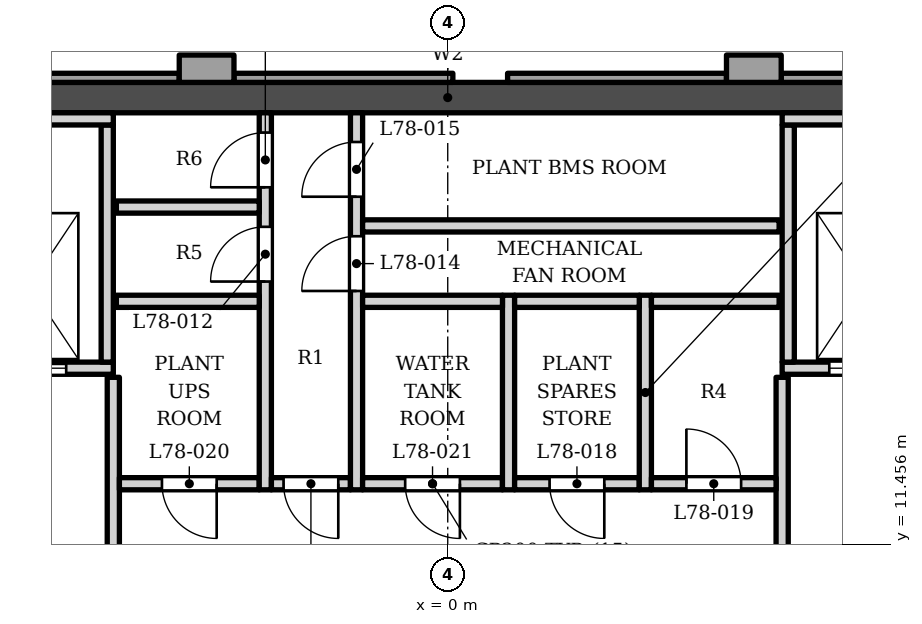
"""IFC4 building model, lengths in metres.
Left out: names, types, materials, properties, quantities, classifications, styles, units other than length and angle.
Written with IfcOpenShell. Run it as: python <this file> out.ifc"""

import sys

from ifc_helpers import new_model, si_unit, direction, frame, frame_2d, origin, place, context, subcontext, project, spatial, polyline, rectangle, outline, extrude, element, fill, save


model = new_model("IFC4")
c1 = context("Model", 3, precision=1e-05, world=origin(), true_north=direction((0.0, 1.0)))
c2 = subcontext(c1, "Body", "Model", "MODEL_VIEW")
j1 = project(units=[si_unit("LENGTHUNIT", "METRE"), si_unit("PLANEANGLEUNIT", "RADIAN")], contexts=[c1])
p1 = place(None, origin())
s1 = spatial("IfcSite", under=j1, at=p1, CompositionType="ELEMENT")
p2 = place(p1, origin())
s2 = spatial("IfcBuilding", under=s1, at=p2, CompositionType="ELEMENT")
p3 = place(p2, frame((0.0, 0.0, 335.5)))
s3 = spatial("IfcBuildingStorey", under=s2, at=p3, CompositionType="ELEMENT", Elevation=335.5)
p4 = place(p3, frame((-12.1, 18.802, 0.0), z_axis=(0.0, 0.0, 1.0), x_axis=(1.0, 0.0, 0.0)))
e1 = element("IfcWall", 1, at=p4, inside=s3, PredefinedType="SHEAR", context=c2, shape_type="SweptSolid", body=[
    extrude(rectangle(XDim=24.2, YDim=0.5, at=frame_2d((12.1, 0.0))), origin(), (0.0, 0.0, 1.0), 5.0),
])
p5 = place(p3, origin())
e2 = element("IfcWall", 2, at=p5, inside=s3, PredefinedType="SOLIDWALL", context=c2, shape_type="SweptSolid", body=[
    extrude(outline(polyline([(4.584, 19.502), (4.584, 19.052), (5.484, 19.052), (5.484, 19.502), (4.584, 19.502)])), origin(), (0.0, 0.0, 1.0), 3.8),
])
p6 = place(p3, origin())
e3 = element("IfcWall", 3, at=p6, inside=s3, PredefinedType="SOLIDWALL", context=c2, shape_type="SweptSolid", body=[
    extrude(outline(polyline([(-4.416, 19.502), (-4.416, 19.052), (-3.516, 19.052), (-3.516, 19.502), (-4.416, 19.502)])), origin(), (0.0, 0.0, 1.0), 3.8),
])
p7 = place(p3, origin())
e4 = element("IfcWall", 4, at=p7, inside=s3, PredefinedType="ELEMENTEDWALL", context=c2, shape_type="SweptSolid", body=[
    extrude(outline(polyline([(9.084, 19.203), (5.484, 19.203), (5.484, 19.052), (9.084, 19.052), (9.084, 19.203)])), origin(), (0.0, 0.0, 1.0), 3.8),
])
p8 = place(p3, origin())
e5 = element("IfcWall", 5, at=p8, inside=s3, PredefinedType="ELEMENTEDWALL", context=c2, shape_type="SweptSolid", body=[
    extrude(outline(polyline([(4.584, 19.203), (0.984, 19.203), (0.984, 19.052), (4.584, 19.052), (4.584, 19.203)])), origin(), (0.0, 0.0, 1.0), 3.8),
])
p9 = place(p3, origin())
e6 = element("IfcWall", 6, at=p9, inside=s3, PredefinedType="ELEMENTEDWALL", context=c2, shape_type="SweptSolid", body=[
    extrude(outline(polyline([(0.084, 19.203), (-3.516, 19.203), (-3.516, 19.052), (0.084, 19.052), (0.084, 19.203)])), origin(), (0.0, 0.0, 1.0), 3.8),
])
p10 = place(p3, origin())
e7 = element("IfcWall", 7, at=p10, inside=s3, PredefinedType="ELEMENTEDWALL", context=c2, shape_type="SweptSolid", body=[
    extrude(outline(polyline([(-4.416, 19.203), (-8.016, 19.203), (-8.016, 19.052), (-4.416, 19.052), (-4.416, 19.203)])), origin(), (0.0, 0.0, 1.0), 3.8),
])
for number, where, z_axis, x_axis in (
    (8, (4.584, 19.278, 3.8), (0.0, 0.0, 1.0), (1.0, 0.0, 0.0)),
    (9, (-4.416, 19.278, 3.8), (0.0, 0.0, 1.0), (1.0, 0.0, 0.0)),
):
    element("IfcWall", number, at=place(p3, frame(where, z_axis=z_axis, x_axis=x_axis)), inside=s3, PredefinedType="ELEMENTEDWALL", context=c2, shape_type="SweptSolid", body=[
        extrude(rectangle(XDim=0.9, YDim=0.45, at=frame_2d((0.45, 0.0))), origin(), (0.0, 0.0, 1.0), 10.851),
    ])
p11 = place(p3, frame((-5.5, 6.353, 0.0), z_axis=(0.0, 0.0, 1.0), x_axis=(0.0, 1.0, 0.0)))
e10 = element("IfcWall", 10, at=p11, inside=s3, PredefinedType="SOLIDWALL", context=c2, shape_type="SweptSolid", body=[
    extrude(outline(polyline([(0.0, 0.0), (7.85, 0.0), (7.85, 4.7), (0.623, 4.7), (0.0, 4.177), (0.0, 0.0)])), frame((0.0, 0.1, 0.0), z_axis=(0.0, -1.0, 0.0), x_axis=(1.0, 0.0, 0.0)), (0.0, 0.0, 1.0), 0.2),
])
p12 = place(p11, frame((3.6, 0.0, 0.0)))
e11 = element("IfcOpeningElement", 11, at=p12, cuts=e10, PredefinedType="OPENING", context=c2, shape_type="SweptSolid", body=[
    extrude(rectangle(XDim=1.4, YDim=2.1, at=frame_2d((0.7, 1.05))), frame((0.0, 0.11, 0.0), z_axis=(0.0, -1.0, 0.0), x_axis=(1.0, 0.0, 0.0)), (0.0, 0.0, 1.0), 0.22),
])
p13 = place(p3, frame((5.5, 6.353, 0.0), z_axis=(0.0, 0.0, 1.0), x_axis=(0.0, 1.0, 0.0)))
e12 = element("IfcWall", 12, at=p13, inside=s3, PredefinedType="SOLIDWALL", context=c2, shape_type="SweptSolid", body=[
    extrude(outline(polyline([(0.0, 0.0), (7.85, 0.0), (7.85, 4.7), (0.623, 4.7), (0.0, 4.177), (0.0, 0.0)])), frame((0.0, 0.1, 0.0), z_axis=(0.0, -1.0, 0.0), x_axis=(1.0, 0.0, 0.0)), (0.0, 0.0, 1.0), 0.2),
])
p14 = place(p13, frame((3.6, 0.0, 0.0)))
e13 = element("IfcOpeningElement", 13, at=p14, cuts=e12, PredefinedType="OPENING", context=c2, shape_type="SweptSolid", body=[
    extrude(rectangle(XDim=1.4, YDim=2.1, at=frame_2d((0.7, 1.05))), frame((0.0, 0.11, 0.0), z_axis=(0.0, -1.0, 0.0), x_axis=(1.0, 0.0, 0.0)), (0.0, 0.0, 1.0), 0.22),
])
p15 = place(p3, frame((-5.4, 12.453, 0.0), z_axis=(0.0, 0.0, 1.0), x_axis=(1.0, 0.0, 0.0)))
e14 = element("IfcWall", 14, at=p15, inside=s3, PredefinedType="PARTITIONING", context=c2, shape_type="SweptSolid", body=[
    extrude(rectangle(XDim=2.3, YDim=0.2, at=frame_2d((1.15, 0.0))), origin(), (0.0, 0.0, 1.0), 4.7),
])
p16 = place(p15, frame((0.7, 0.0, 0.0)))
e15 = element("IfcOpeningElement", 15, at=p16, cuts=e14, PredefinedType="OPENING", context=c2, shape_type="SweptSolid", body=[
    extrude(rectangle(XDim=0.9, YDim=2.1, at=frame_2d((0.45, 1.05))), frame((0.0, 0.11, 0.0), z_axis=(0.0, -1.0, 0.0), x_axis=(1.0, 0.0, 0.0)), (0.0, 0.0, 1.0), 0.22),
])
p17 = place(p3, frame((-3.0, 12.353, 0.0), z_axis=(0.0, 0.0, 1.0), x_axis=(0.0, 1.0, 0.0)))
e16 = element("IfcWall", 16, at=p17, inside=s3, PredefinedType="PARTITIONING", context=c2, shape_type="SweptSolid", body=[
    extrude(rectangle(XDim=6.2, YDim=0.2, at=frame_2d((3.1, 0.0))), origin(), (0.0, 0.0, 1.0), 4.7),
])
p18 = place(p17, frame((3.425, 0.0, 0.0)))
e17 = element("IfcOpeningElement", 17, at=p18, cuts=e16, PredefinedType="OPENING", context=c2, shape_type="SweptSolid", body=[
    extrude(rectangle(XDim=0.9, YDim=2.1, at=frame_2d((0.45, 1.05))), frame((0.0, 0.11, 0.0), z_axis=(0.0, -1.0, 0.0), x_axis=(1.0, 0.0, 0.0)), (0.0, 0.0, 1.0), 0.22),
])
p19 = place(p17, frame((4.975, 0.0, 0.0)))
e18 = element("IfcOpeningElement", 18, at=p19, cuts=e16, PredefinedType="OPENING", context=c2, shape_type="SweptSolid", body=[
    extrude(rectangle(XDim=0.9, YDim=2.1, at=frame_2d((0.45, 1.05))), frame((0.0, 0.11, 0.0), z_axis=(0.0, -1.0, 0.0), x_axis=(1.0, 0.0, 0.0)), (0.0, 0.0, 1.0), 0.22),
])
p20 = place(p3, frame((-2.9, 12.453, 0.0), z_axis=(0.0, 0.0, 1.0), x_axis=(1.0, 0.0, 0.0)))
e19 = element("IfcWall", 19, at=p20, inside=s3, PredefinedType="PARTITIONING", context=c2, shape_type="SweptSolid", body=[
    extrude(rectangle(XDim=1.3, YDim=0.2, at=frame_2d((0.65, 0.0))), origin(), (0.0, 0.0, 1.0), 4.7),
])
p21 = place(p20, frame((0.2, 0.0, 0.0)))
e20 = element("IfcOpeningElement", 20, at=p21, cuts=e19, PredefinedType="OPENING", context=c2, shape_type="SweptSolid", body=[
    extrude(rectangle(XDim=0.9, YDim=2.1, at=frame_2d((0.45, 1.05))), frame((0.0, 0.11, 0.0), z_axis=(0.0, -1.0, 0.0), x_axis=(1.0, 0.0, 0.0)), (0.0, 0.0, 1.0), 0.22),
])
p22 = place(p3, frame((-1.5, 12.353, 0.0), z_axis=(0.0, 0.0, 1.0), x_axis=(0.0, 1.0, 0.0)))
e21 = element("IfcWall", 21, at=p22, inside=s3, PredefinedType="PARTITIONING", context=c2, shape_type="SweptSolid", body=[
    extrude(rectangle(XDim=6.2, YDim=0.2, at=frame_2d((3.1, 0.0))), origin(), (0.0, 0.0, 1.0), 4.7),
])
p23 = place(p22, frame((3.27, 0.0, 0.0)))
e22 = element("IfcOpeningElement", 22, at=p23, cuts=e21, PredefinedType="OPENING", context=c2, shape_type="SweptSolid", body=[
    extrude(rectangle(XDim=0.9, YDim=2.1, at=frame_2d((0.45, 1.05))), frame((0.0, 0.11, 0.0), z_axis=(0.0, -1.0, 0.0), x_axis=(1.0, 0.0, 0.0)), (0.0, 0.0, 1.0), 0.22),
])
p24 = place(p22, frame((4.82, 0.0, 0.0)))
e23 = element("IfcOpeningElement", 23, at=p24, cuts=e21, PredefinedType="OPENING", context=c2, shape_type="SweptSolid", body=[
    extrude(rectangle(XDim=0.9, YDim=2.1, at=frame_2d((0.45, 1.05))), frame((0.0, 0.11, 0.0), z_axis=(0.0, -1.0, 0.0), x_axis=(1.0, 0.0, 0.0)), (0.0, 0.0, 1.0), 0.22),
])
p25 = place(p3, frame((-1.4, 12.453, 0.0), z_axis=(0.0, 0.0, 1.0), x_axis=(1.0, 0.0, 0.0)))
e24 = element("IfcWall", 24, at=p25, inside=s3, PredefinedType="PARTITIONING", context=c2, shape_type="SweptSolid", body=[
    extrude(rectangle(XDim=2.3, YDim=0.2, at=frame_2d((1.15, 0.0))), origin(), (0.0, 0.0, 1.0), 4.7),
])
p26 = place(p25, frame((0.7, 0.0, 0.0)))
e25 = element("IfcOpeningElement", 25, at=p26, cuts=e24, PredefinedType="OPENING", context=c2, shape_type="SweptSolid", body=[
    extrude(rectangle(XDim=0.9, YDim=2.1, at=frame_2d((0.45, 1.05))), frame((0.0, 0.11, 0.0), z_axis=(0.0, -1.0, 0.0), x_axis=(1.0, 0.0, 0.0)), (0.0, 0.0, 1.0), 0.22),
])
p27 = place(p3, frame((1.0, 12.353, 0.0), z_axis=(0.0, 0.0, 1.0), x_axis=(0.0, 1.0, 0.0)))
e26 = element("IfcWall", 26, at=p27, inside=s3, PredefinedType="PARTITIONING", context=c2, shape_type="SweptSolid", body=[
    extrude(rectangle(XDim=3.2, YDim=0.2, at=frame_2d((1.6, 0.0))), origin(), (0.0, 0.0, 1.0), 4.7),
])
p28 = place(p3, frame((1.1, 12.453, 0.0), z_axis=(0.0, 0.0, 1.0), x_axis=(1.0, 0.0, 0.0)))
e27 = element("IfcWall", 27, at=p28, inside=s3, PredefinedType="PARTITIONING", context=c2, shape_type="SweptSolid", body=[
    extrude(rectangle(XDim=2.05, YDim=0.2, at=frame_2d((1.025, 0.0))), origin(), (0.0, 0.0, 1.0), 4.7),
])
p29 = place(p28, frame((0.575, 0.0, 0.0)))
e28 = element("IfcOpeningElement", 28, at=p29, cuts=e27, PredefinedType="OPENING", context=c2, shape_type="SweptSolid", body=[
    extrude(rectangle(XDim=0.9, YDim=2.1, at=frame_2d((0.45, 1.05))), frame((0.0, 0.11, 0.0), z_axis=(0.0, -1.0, 0.0), x_axis=(1.0, 0.0, 0.0)), (0.0, 0.0, 1.0), 0.22),
])
p30 = place(p3, frame((3.25, 12.353, 0.0), z_axis=(0.0, 0.0, 1.0), x_axis=(0.0, 1.0, 0.0)))
e29 = element("IfcWall", 29, at=p30, inside=s3, PredefinedType="PARTITIONING", context=c2, shape_type="SweptSolid", body=[
    extrude(rectangle(XDim=3.2, YDim=0.2, at=frame_2d((1.6, 0.0))), origin(), (0.0, 0.0, 1.0), 4.7),
])
p31 = place(p3, frame((3.35, 12.453, 0.0), z_axis=(0.0, 0.0, 1.0), x_axis=(1.0, 0.0, 0.0)))
e30 = element("IfcWall", 30, at=p31, inside=s3, PredefinedType="PARTITIONING", context=c2, shape_type="SweptSolid", body=[
    extrude(rectangle(XDim=2.05, YDim=0.2, at=frame_2d((1.025, 0.0))), origin(), (0.0, 0.0, 1.0), 4.7),
])
p32 = place(p31, frame((0.575, 0.0, 0.0)))
e31 = element("IfcOpeningElement", 31, at=p32, cuts=e30, PredefinedType="OPENING", context=c2, shape_type="SweptSolid", body=[
    extrude(rectangle(XDim=0.9, YDim=2.1, at=frame_2d((0.45, 1.05))), frame((0.0, 0.11, 0.0), z_axis=(0.0, -1.0, 0.0), x_axis=(1.0, 0.0, 0.0)), (0.0, 0.0, 1.0), 0.22),
])
p33 = place(p3, frame((-8.05, 14.353, 0.0), z_axis=(0.0, 0.0, 1.0), x_axis=(1.0, 0.0, 0.0)))
e32 = element("IfcWall", 32, at=p33, inside=s3, PredefinedType="SOLIDWALL", context=c2, shape_type="SweptSolid", body=[
    extrude(rectangle(XDim=2.55, YDim=0.2, at=frame_2d((1.275, 0.0))), origin(), (0.0, 0.0, 1.0), 4.7),
])
p34 = place(p33, frame((0.575, 0.0, 0.0)))
e33 = element("IfcOpeningElement", 33, at=p34, cuts=e32, PredefinedType="OPENING", context=c2, shape_type="SweptSolid", body=[
    extrude(rectangle(XDim=1.2, YDim=2.1, at=frame_2d((0.6, 1.05))), frame((0.0, 0.11, 0.0), z_axis=(0.0, -1.0, 0.0), x_axis=(1.0, 0.0, 0.0)), (0.0, 0.0, 1.0), 0.22),
])
p35 = place(p3, frame((5.5, 14.353, 0.0), z_axis=(0.0, 0.0, 1.0), x_axis=(1.0, 0.0, 0.0)))
e34 = element("IfcWall", 34, at=p35, inside=s3, PredefinedType="SOLIDWALL", context=c2, shape_type="SweptSolid", body=[
    extrude(rectangle(XDim=2.55, YDim=0.2, at=frame_2d((1.275, 0.0))), origin(), (0.0, 0.0, 1.0), 4.7),
])
p36 = place(p35, frame((0.775, 0.0, 0.0)))
e35 = element("IfcOpeningElement", 35, at=p36, cuts=e34, PredefinedType="OPENING", context=c2, shape_type="SweptSolid", body=[
    extrude(rectangle(XDim=1.2, YDim=2.1, at=frame_2d((0.6, 1.05))), frame((0.0, 0.11, 0.0), z_axis=(0.0, -1.0, 0.0), x_axis=(1.0, 0.0, 0.0)), (0.0, 0.0, 1.0), 0.22),
])
for number, where, z_axis, x_axis in (
    (36, (-5.6, 14.453, 0.0), (0.0, 0.0, 1.0), (0.0, 1.0, 0.0)),
    (37, (5.6, 14.453, 0.0), (0.0, 0.0, 1.0), (0.0, 1.0, 0.0)),
):
    element("IfcWall", number, at=place(p3, frame(where, z_axis=z_axis, x_axis=x_axis)), inside=s3, PredefinedType="SOLIDWALL", context=c2, shape_type="SweptSolid", body=[
        extrude(rectangle(XDim=3.9, YDim=0.2, at=frame_2d((1.95, 0.0))), origin(), (0.0, 0.0, 1.0), 4.7),
    ])
p37 = place(p3, frame((-5.45, 15.453, 0.0), z_axis=(0.0, 0.0, 1.0), x_axis=(1.0, 0.0, 0.0)))
e38 = element("IfcWall", 38, at=p37, inside=s3, PredefinedType="SOLIDWALL", context=c2, shape_type="SweptSolid", body=[
    extrude(rectangle(XDim=2.35, YDim=0.2, at=frame_2d((1.175, 0.0))), origin(), (0.0, 0.0, 1.0), 4.7),
])
p38 = place(p3, frame((-1.4, 15.453, 0.0), z_axis=(0.0, 0.0, 1.0), x_axis=(1.0, 0.0, 0.0)))
e39 = element("IfcWall", 39, at=p38, inside=s3, PredefinedType="PARTITIONING", context=c2, shape_type="SweptSolid", body=[
    extrude(rectangle(XDim=2.3, YDim=0.2, at=frame_2d((1.15, 0.0))), origin(), (0.0, 0.0, 1.0), 4.7),
])
p39 = place(p3, frame((1.1, 15.453, 0.0), z_axis=(0.0, 0.0, 1.0), x_axis=(1.0, 0.0, 0.0)))
e40 = element("IfcWall", 40, at=p39, inside=s3, PredefinedType="PARTITIONING", context=c2, shape_type="SweptSolid", body=[
    extrude(rectangle(XDim=2.05, YDim=0.2, at=frame_2d((1.025, 0.0))), origin(), (0.0, 0.0, 1.0), 4.7),
])
p40 = place(p3, frame((3.35, 15.453, 0.0), z_axis=(0.0, 0.0, 1.0), x_axis=(1.0, 0.0, 0.0)))
e41 = element("IfcWall", 41, at=p40, inside=s3, PredefinedType="SOLIDWALL", context=c2, shape_type="SweptSolid", body=[
    extrude(rectangle(XDim=2.1, YDim=0.2, at=frame_2d((1.05, 0.0))), origin(), (0.0, 0.0, 1.0), 4.7),
])
p41 = place(p3, frame((-1.4, 16.693, 0.0), z_axis=(0.0, 0.0, 1.0), x_axis=(1.0, 0.0, 0.0)))
e42 = element("IfcWall", 42, at=p41, inside=s3, PredefinedType="SOLIDWALL", context=c2, shape_type="SweptSolid", body=[
    extrude(rectangle(XDim=6.85, YDim=0.2, at=frame_2d((3.425, 0.0))), origin(), (0.0, 0.0, 1.0), 4.7),
])
p42 = place(p3, frame((-5.45, 17.003, 0.0), z_axis=(0.0, 0.0, 1.0), x_axis=(1.0, 0.0, 0.0)))
e43 = element("IfcWall", 43, at=p42, inside=s3, PredefinedType="SOLIDWALL", context=c2, shape_type="SweptSolid", body=[
    extrude(rectangle(XDim=2.35, YDim=0.2, at=frame_2d((1.175, 0.0))), origin(), (0.0, 0.0, 1.0), 4.7),
])
for number, where, z_axis, x_axis in (
    (44, (-8.05, 18.453, 0.0), (0.0, 0.0, 1.0), (1.0, 0.0, 0.0)),
    (45, (5.5, 18.453, 0.0), (0.0, 0.0, 1.0), (1.0, 0.0, 0.0)),
):
    element("IfcWall", number, at=place(p3, frame(where, z_axis=z_axis, x_axis=x_axis)), inside=s3, PredefinedType="SOLIDWALL", context=c2, shape_type="SweptSolid", body=[
        extrude(rectangle(XDim=2.55, YDim=0.2, at=frame_2d((1.275, 0.0))), origin(), (0.0, 0.0, 1.0), 4.7),
    ])
p43 = place(p34, origin())
e46 = element("IfcDoor", 46, at=p43, inside=s3, OperationType="DOUBLE_DOOR_SLIDING", PredefinedType="DOOR", context=c2, shape_type="SweptSolid", body=[
    extrude(rectangle(XDim=1.2, YDim=2.1, at=frame_2d((0.6, 1.05))), frame((0.0, 0.025, 0.0), z_axis=(0.0, -1.0, 0.0), x_axis=(1.0, 0.0, 0.0)), (0.0, 0.0, 1.0), 0.05),
])
fill(e33, e46)
p44 = place(p36, origin())
e47 = element("IfcDoor", 47, at=p44, inside=s3, OperationType="DOUBLE_DOOR_SLIDING", PredefinedType="DOOR", context=c2, shape_type="SweptSolid", body=[
    extrude(rectangle(XDim=1.2, YDim=2.1, at=frame_2d((0.6, 1.05))), frame((0.0, 0.025, 0.0), z_axis=(0.0, -1.0, 0.0), x_axis=(1.0, 0.0, 0.0)), (0.0, 0.0, 1.0), 0.05),
])
fill(e35, e47)
p45 = place(p21, origin())
e48 = element("IfcDoor", 48, at=p45, inside=s3, OperationType="SINGLE_SWING_RIGHT", PredefinedType="DOOR", context=c2, shape_type="SweptSolid", body=[
    extrude(rectangle(XDim=0.9, YDim=2.1, at=frame_2d((0.45, 1.05))), frame((0.0, 0.025, 0.0), z_axis=(0.0, -1.0, 0.0), x_axis=(1.0, 0.0, 0.0)), (0.0, 0.0, 1.0), 0.05),
])
fill(e20, e48)
p46 = place(p18, origin())
e49 = element("IfcDoor", 49, at=p46, inside=s3, OperationType="SINGLE_SWING_LEFT", PredefinedType="DOOR", context=c2, shape_type="SweptSolid", body=[
    extrude(rectangle(XDim=0.9, YDim=2.1, at=frame_2d((0.45, 1.05))), frame((0.0, 0.025, 0.0), z_axis=(0.0, -1.0, 0.0), x_axis=(1.0, 0.0, 0.0)), (0.0, 0.0, 1.0), 0.05),
])
fill(e17, e49)
p47 = place(p19, origin())
e50 = element("IfcDoor", 50, at=p47, inside=s3, OperationType="SINGLE_SWING_LEFT", PredefinedType="DOOR", context=c2, shape_type="SweptSolid", body=[
    extrude(rectangle(XDim=0.9, YDim=2.1, at=frame_2d((0.45, 1.05))), frame((0.0, 0.025, 0.0), z_axis=(0.0, -1.0, 0.0), x_axis=(1.0, 0.0, 0.0)), (0.0, 0.0, 1.0), 0.05),
])
fill(e18, e50)
p48 = place(p23, origin())
e51 = element("IfcDoor", 51, at=p48, inside=s3, OperationType="SINGLE_SWING_LEFT", PredefinedType="DOOR", context=c2, shape_type="SweptSolid", body=[
    extrude(rectangle(XDim=0.9, YDim=2.1, at=frame_2d((0.45, 1.05))), frame((0.0, 0.025, 0.0), z_axis=(0.0, -1.0, 0.0), x_axis=(1.0, 0.0, 0.0)), (0.0, 0.0, 1.0), 0.05),
])
fill(e22, e51)
p49 = place(p24, origin())
e52 = element("IfcDoor", 52, at=p49, inside=s3, OperationType="SINGLE_SWING_LEFT", PredefinedType="DOOR", context=c2, shape_type="SweptSolid", body=[
    extrude(rectangle(XDim=0.9, YDim=2.1, at=frame_2d((0.45, 1.05))), frame((0.0, 0.025, 0.0), z_axis=(0.0, -1.0, 0.0), x_axis=(1.0, 0.0, 0.0)), (0.0, 0.0, 1.0), 0.05),
])
fill(e23, e52)
p50 = place(p29, origin())
e53 = element("IfcDoor", 53, at=p50, inside=s3, OperationType="SINGLE_SWING_RIGHT", PredefinedType="DOOR", context=c2, shape_type="SweptSolid", body=[
    extrude(rectangle(XDim=0.9, YDim=2.1, at=frame_2d((0.45, 1.05))), frame((0.0, 0.025, 0.0), z_axis=(0.0, -1.0, 0.0), x_axis=(1.0, 0.0, 0.0)), (0.0, 0.0, 1.0), 0.05),
])
fill(e28, e53)
p51 = place(p32, origin())
e54 = element("IfcDoor", 54, at=p51, inside=s3, OperationType="SINGLE_SWING_LEFT", PredefinedType="DOOR", context=c2, shape_type="SweptSolid", body=[
    extrude(rectangle(XDim=0.9, YDim=2.1, at=frame_2d((0.45, 1.05))), frame((0.0, 0.025, 0.0), z_axis=(0.0, -1.0, 0.0), x_axis=(1.0, 0.0, 0.0)), (0.0, 0.0, 1.0), 0.05),
])
fill(e31, e54)
p52 = place(p16, origin())
e55 = element("IfcDoor", 55, at=p52, inside=s3, OperationType="SINGLE_SWING_RIGHT", PredefinedType="DOOR", context=c2, shape_type="SweptSolid", body=[
    extrude(rectangle(XDim=0.9, YDim=2.1, at=frame_2d((0.45, 1.05))), frame((0.0, 0.025, 0.0), z_axis=(0.0, -1.0, 0.0), x_axis=(1.0, 0.0, 0.0)), (0.0, 0.0, 1.0), 0.05),
])
fill(e15, e55)
p53 = place(p26, origin())
e56 = element("IfcDoor", 56, at=p53, inside=s3, OperationType="SINGLE_SWING_RIGHT", PredefinedType="DOOR", context=c2, shape_type="SweptSolid", body=[
    extrude(rectangle(XDim=0.9, YDim=2.1, at=frame_2d((0.45, 1.05))), frame((0.0, 0.025, 0.0), z_axis=(0.0, -1.0, 0.0), x_axis=(1.0, 0.0, 0.0)), (0.0, 0.0, 1.0), 0.05),
])
fill(e25, e56)
save(model, sys.argv[1])
